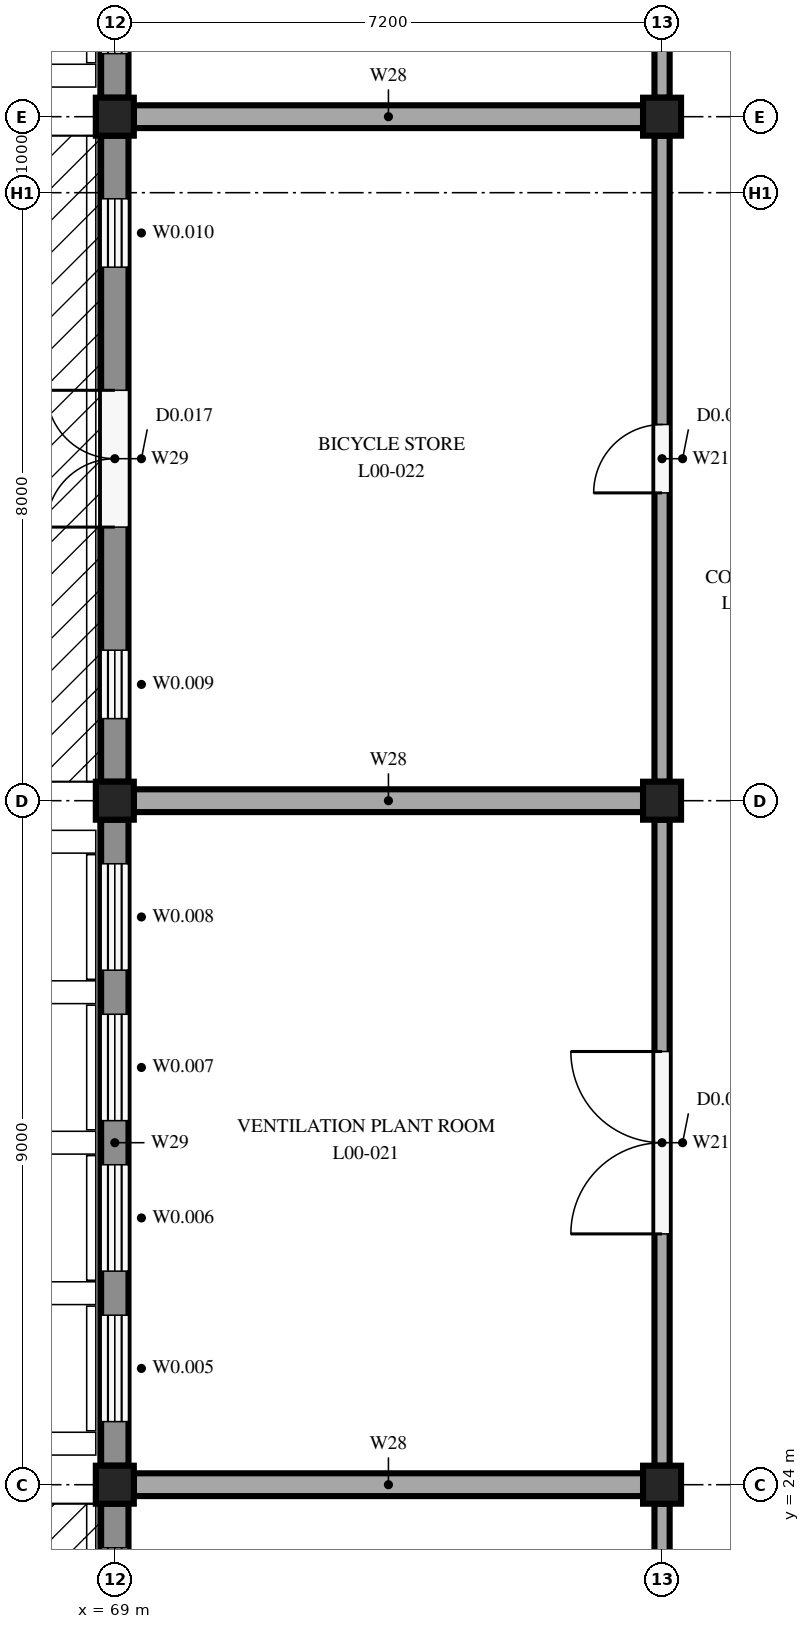
"""IFC4 building model, lengths in metres.
Left out: names, types, materials, properties, quantities, classifications, styles, units other than length and angle.
Written with IfcOpenShell. Run it as: python <this file> out.ifc"""

import sys

from ifc_helpers import new_model, si_unit, direction, frame, frame_2d, origin, origin_2d, place, context, subcontext, project, spatial, rectangle, extrude, element, fill, save


model = new_model("IFC4")
c1 = context("Model", 3, precision=1e-05, world=origin(), true_north=direction((0.0, 1.0)))
c2 = subcontext(c1, "Body", "Model", "MODEL_VIEW")
j1 = project(units=[si_unit("LENGTHUNIT", "METRE"), si_unit("PLANEANGLEUNIT", "RADIAN")], contexts=[c1])
p1 = place(None, origin())
s1 = spatial("IfcSite", under=j1, at=p1, CompositionType="ELEMENT")
p2 = place(p1, origin())
s2 = spatial("IfcBuilding", under=s1, at=p2, CompositionType="ELEMENT")
p3 = place(p2, origin())
s3 = spatial("IfcBuildingStorey", under=s2, at=p3, CompositionType="ELEMENT", Elevation=0.0)
for number, where, z_axis, x_axis in (
    (1, (69.0, 24.0, 0.0), (0.0, 0.0, 1.0), (1.0, 0.0, 0.0)),
    (2, (69.0, 33.0, 0.0), (0.0, 0.0, 1.0), (1.0, 0.0, 0.0)),
    (3, (69.0, 42.0, 0.0), (0.0, 0.0, 1.0), (1.0, 0.0, 0.0)),
    (4, (76.2, 24.0, 0.0), (0.0, 0.0, 1.0), (1.0, 0.0, 0.0)),
    (5, (76.2, 33.0, 0.0), (0.0, 0.0, 1.0), (1.0, 0.0, 0.0)),
    (6, (76.2, 42.0, 0.0), (0.0, 0.0, 1.0), (1.0, 0.0, 0.0)),
):
    element("IfcColumn", number, at=place(p3, frame(where, z_axis=z_axis, x_axis=x_axis)), inside=s3, PredefinedType="COLUMN", context=c2, shape_type="SweptSolid", body=[
        extrude(rectangle(XDim=0.5, YDim=0.5, at=origin_2d()), origin(), (0.0, 0.0, 1.0), 4.25),
    ])
p4 = place(p3, frame((69.0, 15.25, 0.0), z_axis=(0.0, 0.0, 1.0), x_axis=(0.0, 1.0, 0.0)))
e7 = element("IfcWall", 7, at=p4, inside=s3, PredefinedType="STANDARD", context=c2, shape_type="SweptSolid", body=[
    extrude(rectangle(XDim=8.5, YDim=0.36, at=frame_2d((4.25, 0.0))), origin(), (0.0, 0.0, 1.0), 3.75),
])
p5 = place(p4, frame((0.58, 0.0, 2.2)))
e8 = element("IfcOpeningElement", 8, at=p5, cuts=e7, PredefinedType="OPENING", context=c2, shape_type="SweptSolid", body=[
    extrude(rectangle(XDim=1.4, YDim=1.2, at=frame_2d((0.7, 0.6))), frame((0.0, 0.19, 0.0), z_axis=(0.0, -1.0, 0.0), x_axis=(1.0, 0.0, 0.0)), (0.0, 0.0, 1.0), 0.38),
])
p6 = place(p4, frame((3.625, 0.0, 0.0)))
e9 = element("IfcOpeningElement", 9, at=p6, cuts=e7, PredefinedType="OPENING", context=c2, shape_type="SweptSolid", body=[
    extrude(rectangle(XDim=1.2, YDim=2.1, at=frame_2d((0.6, 1.05))), frame((0.0, 0.19, 0.0), z_axis=(0.0, -1.0, 0.0), x_axis=(1.0, 0.0, 0.0)), (0.0, 0.0, 1.0), 0.38),
])
p7 = place(p4, frame((6.52, 0.0, 2.2)))
e10 = element("IfcOpeningElement", 10, at=p7, cuts=e7, PredefinedType="OPENING", context=c2, shape_type="SweptSolid", body=[
    extrude(rectangle(XDim=1.4, YDim=1.2, at=frame_2d((0.7, 0.6))), frame((0.0, 0.19, 0.0), z_axis=(0.0, -1.0, 0.0), x_axis=(1.0, 0.0, 0.0)), (0.0, 0.0, 1.0), 0.38),
])
p8 = place(p3, frame((69.0, 24.25, 0.0), z_axis=(0.0, 0.0, 1.0), x_axis=(0.0, 1.0, 0.0)))
e11 = element("IfcWall", 11, at=p8, inside=s3, PredefinedType="STANDARD", context=c2, shape_type="SweptSolid", body=[
    extrude(rectangle(XDim=8.5, YDim=0.36, at=frame_2d((4.25, 0.0))), origin(), (0.0, 0.0, 1.0), 3.75),
])
p9 = place(p8, frame((0.58, 0.0, 2.2)))
e12 = element("IfcOpeningElement", 12, at=p9, cuts=e11, PredefinedType="OPENING", context=c2, shape_type="SweptSolid", body=[
    extrude(rectangle(XDim=1.4, YDim=1.2, at=frame_2d((0.7, 0.6))), frame((0.0, 0.19, 0.0), z_axis=(0.0, -1.0, 0.0), x_axis=(1.0, 0.0, 0.0)), (0.0, 0.0, 1.0), 0.38),
])
p10 = place(p8, frame((2.56, 0.0, 2.2)))
e13 = element("IfcOpeningElement", 13, at=p10, cuts=e11, PredefinedType="OPENING", context=c2, shape_type="SweptSolid", body=[
    extrude(rectangle(XDim=1.4, YDim=1.2, at=frame_2d((0.7, 0.6))), frame((0.0, 0.19, 0.0), z_axis=(0.0, -1.0, 0.0), x_axis=(1.0, 0.0, 0.0)), (0.0, 0.0, 1.0), 0.38),
])
p11 = place(p8, frame((4.54, 0.0, 2.2)))
e14 = element("IfcOpeningElement", 14, at=p11, cuts=e11, PredefinedType="OPENING", context=c2, shape_type="SweptSolid", body=[
    extrude(rectangle(XDim=1.4, YDim=1.2, at=frame_2d((0.7, 0.6))), frame((0.0, 0.19, 0.0), z_axis=(0.0, -1.0, 0.0), x_axis=(1.0, 0.0, 0.0)), (0.0, 0.0, 1.0), 0.38),
])
p12 = place(p8, frame((6.52, 0.0, 2.2)))
e15 = element("IfcOpeningElement", 15, at=p12, cuts=e11, PredefinedType="OPENING", context=c2, shape_type="SweptSolid", body=[
    extrude(rectangle(XDim=1.4, YDim=1.2, at=frame_2d((0.7, 0.6))), frame((0.0, 0.19, 0.0), z_axis=(0.0, -1.0, 0.0), x_axis=(1.0, 0.0, 0.0)), (0.0, 0.0, 1.0), 0.38),
])
p13 = place(p3, frame((69.0, 33.25, 0.0), z_axis=(0.0, 0.0, 1.0), x_axis=(0.0, 1.0, 0.0)))
e16 = element("IfcWall", 16, at=p13, inside=s3, PredefinedType="STANDARD", context=c2, shape_type="SweptSolid", body=[
    extrude(rectangle(XDim=8.5, YDim=0.36, at=frame_2d((4.25, 0.0))), origin(), (0.0, 0.0, 1.0), 3.75),
])
p14 = place(p13, frame((0.83, 0.0, 1.6)))
e17 = element("IfcOpeningElement", 17, at=p14, cuts=e16, PredefinedType="OPENING", context=c2, shape_type="SweptSolid", body=[
    extrude(rectangle(XDim=0.9, YDim=1.0, at=frame_2d((0.45, 0.5))), frame((0.0, 0.19, 0.0), z_axis=(0.0, -1.0, 0.0), x_axis=(1.0, 0.0, 0.0)), (0.0, 0.0, 1.0), 0.38),
])
p15 = place(p13, frame((3.35, 0.0, 0.0)))
e18 = element("IfcOpeningElement", 18, at=p15, cuts=e16, PredefinedType="OPENING", context=c2, shape_type="SweptSolid", body=[
    extrude(rectangle(XDim=1.8, YDim=2.1, at=frame_2d((0.9, 1.05))), frame((0.0, 0.19, 0.0), z_axis=(0.0, -1.0, 0.0), x_axis=(1.0, 0.0, 0.0)), (0.0, 0.0, 1.0), 0.38),
])
p16 = place(p13, frame((6.77, 0.0, 1.6)))
e19 = element("IfcOpeningElement", 19, at=p16, cuts=e16, PredefinedType="OPENING", context=c2, shape_type="SweptSolid", body=[
    extrude(rectangle(XDim=0.9, YDim=1.0, at=frame_2d((0.45, 0.5))), frame((0.0, 0.19, 0.0), z_axis=(0.0, -1.0, 0.0), x_axis=(1.0, 0.0, 0.0)), (0.0, 0.0, 1.0), 0.38),
])
p17 = place(p3, frame((69.0, 42.25, 0.0), z_axis=(0.0, 0.0, 1.0), x_axis=(0.0, 1.0, 0.0)))
e20 = element("IfcWall", 20, at=p17, inside=s3, PredefinedType="STANDARD", context=c2, shape_type="SweptSolid", body=[
    extrude(rectangle(XDim=8.5, YDim=0.36, at=frame_2d((4.25, 0.0))), origin(), (0.0, 0.0, 1.0), 3.75),
])
p18 = place(p17, frame((0.58, 0.0, 2.2)))
e21 = element("IfcOpeningElement", 21, at=p18, cuts=e20, PredefinedType="OPENING", context=c2, shape_type="SweptSolid", body=[
    extrude(rectangle(XDim=1.4, YDim=1.2, at=frame_2d((0.7, 0.6))), frame((0.0, 0.19, 0.0), z_axis=(0.0, -1.0, 0.0), x_axis=(1.0, 0.0, 0.0)), (0.0, 0.0, 1.0), 0.38),
])
p19 = place(p17, frame((2.56, 0.0, 2.2)))
e22 = element("IfcOpeningElement", 22, at=p19, cuts=e20, PredefinedType="OPENING", context=c2, shape_type="SweptSolid", body=[
    extrude(rectangle(XDim=1.4, YDim=1.2, at=frame_2d((0.7, 0.6))), frame((0.0, 0.19, 0.0), z_axis=(0.0, -1.0, 0.0), x_axis=(1.0, 0.0, 0.0)), (0.0, 0.0, 1.0), 0.38),
])
p20 = place(p17, frame((5.925, 0.0, 0.0)))
e23 = element("IfcOpeningElement", 23, at=p20, cuts=e20, PredefinedType="OPENING", context=c2, shape_type="SweptSolid", body=[
    extrude(rectangle(XDim=1.2, YDim=2.1, at=frame_2d((0.6, 1.05))), frame((0.0, 0.19, 0.0), z_axis=(0.0, -1.0, 0.0), x_axis=(1.0, 0.0, 0.0)), (0.0, 0.0, 1.0), 0.38),
])
p21 = place(p3, frame((76.2, 15.25, 0.0), z_axis=(0.0, 0.0, 1.0), x_axis=(0.0, 1.0, 0.0)))
e24 = element("IfcWall", 24, at=p21, inside=s3, PredefinedType="PARTITIONING", context=c2, shape_type="SweptSolid", body=[
    extrude(rectangle(XDim=8.5, YDim=0.2, at=frame_2d((4.25, 0.0))), origin(), (0.0, 0.0, 1.0), 3.8),
])
p22 = place(p21, frame((3.05, 0.0, 0.0)))
e25 = element("IfcOpeningElement", 25, at=p22, cuts=e24, PredefinedType="OPENING", context=c2, shape_type="SweptSolid", body=[
    extrude(rectangle(XDim=2.4, YDim=2.1, at=frame_2d((1.2, 1.05))), frame((0.0, 0.11, 0.0), z_axis=(0.0, -1.0, 0.0), x_axis=(1.0, 0.0, 0.0)), (0.0, 0.0, 1.0), 0.22),
])
p23 = place(p3, frame((76.2, 24.25, 0.0), z_axis=(0.0, 0.0, 1.0), x_axis=(0.0, 1.0, 0.0)))
e26 = element("IfcWall", 26, at=p23, inside=s3, PredefinedType="PARTITIONING", context=c2, shape_type="SweptSolid", body=[
    extrude(rectangle(XDim=8.5, YDim=0.2, at=frame_2d((4.25, 0.0))), origin(), (0.0, 0.0, 1.0), 3.8),
])
p24 = place(p23, frame((3.05, 0.0, 0.0)))
e27 = element("IfcOpeningElement", 27, at=p24, cuts=e26, PredefinedType="OPENING", context=c2, shape_type="SweptSolid", body=[
    extrude(rectangle(XDim=2.4, YDim=2.1, at=frame_2d((1.2, 1.05))), frame((0.0, 0.11, 0.0), z_axis=(0.0, -1.0, 0.0), x_axis=(1.0, 0.0, 0.0)), (0.0, 0.0, 1.0), 0.22),
])
p25 = place(p3, frame((76.2, 33.25, 0.0), z_axis=(0.0, 0.0, 1.0), x_axis=(0.0, 1.0, 0.0)))
e28 = element("IfcWall", 28, at=p25, inside=s3, PredefinedType="PARTITIONING", context=c2, shape_type="SweptSolid", body=[
    extrude(rectangle(XDim=8.5, YDim=0.2, at=frame_2d((4.25, 0.0))), origin(), (0.0, 0.0, 1.0), 3.8),
])
p26 = place(p25, frame((3.8, 0.0, 0.0)))
e29 = element("IfcOpeningElement", 29, at=p26, cuts=e28, PredefinedType="OPENING", context=c2, shape_type="SweptSolid", body=[
    extrude(rectangle(XDim=0.9, YDim=2.1, at=frame_2d((0.45, 1.05))), frame((0.0, 0.11, 0.0), z_axis=(0.0, -1.0, 0.0), x_axis=(1.0, 0.0, 0.0)), (0.0, 0.0, 1.0), 0.22),
])
p27 = place(p3, frame((76.2, 42.25, 0.0), z_axis=(0.0, 0.0, 1.0), x_axis=(0.0, 1.0, 0.0)))
e30 = element("IfcWall", 30, at=p27, inside=s3, PredefinedType="PARTITIONING", context=c2, shape_type="SweptSolid", body=[
    extrude(rectangle(XDim=8.5, YDim=0.2, at=frame_2d((4.25, 0.0))), origin(), (0.0, 0.0, 1.0), 3.8),
])
p28 = place(p27, frame((1.45, 0.0, 0.0)))
e31 = element("IfcOpeningElement", 31, at=p28, cuts=e30, PredefinedType="OPENING", context=c2, shape_type="SweptSolid", body=[
    extrude(rectangle(XDim=1.2, YDim=2.1, at=frame_2d((0.6, 1.05))), frame((0.0, 0.11, 0.0), z_axis=(0.0, -1.0, 0.0), x_axis=(1.0, 0.0, 0.0)), (0.0, 0.0, 1.0), 0.22),
])
p29 = place(p27, frame((6.0, 0.0, 0.0)))
e32 = element("IfcOpeningElement", 32, at=p29, cuts=e30, PredefinedType="OPENING", context=c2, shape_type="SweptSolid", body=[
    extrude(rectangle(XDim=0.9, YDim=2.1, at=frame_2d((0.45, 1.05))), frame((0.0, 0.11, 0.0), z_axis=(0.0, -1.0, 0.0), x_axis=(1.0, 0.0, 0.0)), (0.0, 0.0, 1.0), 0.22),
])
for number, where, z_axis, x_axis in (
    (33, (69.25, 24.0, 0.0), (0.0, 0.0, 1.0), (1.0, 0.0, 0.0)),
    (34, (69.25, 33.0, 0.0), (0.0, 0.0, 1.0), (1.0, 0.0, 0.0)),
    (35, (69.25, 42.0, 0.0), (0.0, 0.0, 1.0), (1.0, 0.0, 0.0)),
):
    element("IfcWall", number, at=place(p3, frame(where, z_axis=z_axis, x_axis=x_axis)), inside=s3, PredefinedType="SOLIDWALL", context=c2, shape_type="SweptSolid", body=[
        extrude(rectangle(XDim=6.7, YDim=0.3, at=frame_2d((3.35, 0.0))), origin(), (0.0, 0.0, 1.0), 3.8),
    ])
p30 = place(p7, origin())
e36 = element("IfcWindow", 36, at=p30, inside=s3, PartitioningType="DOUBLE_PANEL_VERTICAL", PredefinedType="WINDOW", context=c2, shape_type="SweptSolid", body=[
    extrude(rectangle(XDim=1.4, YDim=1.2, at=frame_2d((0.7, 0.6))), frame((0.0, 0.03, 0.0), z_axis=(0.0, -1.0, 0.0), x_axis=(1.0, 0.0, 0.0)), (0.0, 0.0, 1.0), 0.06),
])
fill(e10, e36)
p31 = place(p9, origin())
e37 = element("IfcWindow", 37, at=p31, inside=s3, PartitioningType="DOUBLE_PANEL_VERTICAL", PredefinedType="WINDOW", context=c2, shape_type="SweptSolid", body=[
    extrude(rectangle(XDim=1.4, YDim=1.2, at=frame_2d((0.7, 0.6))), frame((0.0, 0.03, 0.0), z_axis=(0.0, -1.0, 0.0), x_axis=(1.0, 0.0, 0.0)), (0.0, 0.0, 1.0), 0.06),
])
fill(e12, e37)
p32 = place(p10, origin())
e38 = element("IfcWindow", 38, at=p32, inside=s3, PartitioningType="DOUBLE_PANEL_VERTICAL", PredefinedType="WINDOW", context=c2, shape_type="SweptSolid", body=[
    extrude(rectangle(XDim=1.4, YDim=1.2, at=frame_2d((0.7, 0.6))), frame((0.0, 0.03, 0.0), z_axis=(0.0, -1.0, 0.0), x_axis=(1.0, 0.0, 0.0)), (0.0, 0.0, 1.0), 0.06),
])
fill(e13, e38)
p33 = place(p11, origin())
e39 = element("IfcWindow", 39, at=p33, inside=s3, PartitioningType="DOUBLE_PANEL_VERTICAL", PredefinedType="WINDOW", context=c2, shape_type="SweptSolid", body=[
    extrude(rectangle(XDim=1.4, YDim=1.2, at=frame_2d((0.7, 0.6))), frame((0.0, 0.03, 0.0), z_axis=(0.0, -1.0, 0.0), x_axis=(1.0, 0.0, 0.0)), (0.0, 0.0, 1.0), 0.06),
])
fill(e14, e39)
p34 = place(p12, origin())
e40 = element("IfcWindow", 40, at=p34, inside=s3, PartitioningType="DOUBLE_PANEL_VERTICAL", PredefinedType="WINDOW", context=c2, shape_type="SweptSolid", body=[
    extrude(rectangle(XDim=1.4, YDim=1.2, at=frame_2d((0.7, 0.6))), frame((0.0, 0.03, 0.0), z_axis=(0.0, -1.0, 0.0), x_axis=(1.0, 0.0, 0.0)), (0.0, 0.0, 1.0), 0.06),
])
fill(e15, e40)
p35 = place(p14, origin())
e41 = element("IfcWindow", 41, at=p35, inside=s3, PartitioningType="SINGLE_PANEL", PredefinedType="WINDOW", context=c2, shape_type="SweptSolid", body=[
    extrude(rectangle(XDim=0.9, YDim=1.0, at=frame_2d((0.45, 0.5))), frame((0.0, 0.03, 0.0), z_axis=(0.0, -1.0, 0.0), x_axis=(1.0, 0.0, 0.0)), (0.0, 0.0, 1.0), 0.06),
])
fill(e17, e41)
p36 = place(p15, origin())
e42 = element("IfcDoor", 42, at=p36, inside=s3, OperationType="DOUBLE_DOOR_SINGLE_SWING", PredefinedType="DOOR", context=c2, shape_type="SweptSolid", body=[
    extrude(rectangle(XDim=1.8, YDim=2.1, at=frame_2d((0.9, 1.05))), frame((0.0, 0.025, 0.0), z_axis=(0.0, -1.0, 0.0), x_axis=(1.0, 0.0, 0.0)), (0.0, 0.0, 1.0), 0.05),
])
fill(e18, e42)
p37 = place(p16, origin())
e43 = element("IfcWindow", 43, at=p37, inside=s3, PartitioningType="SINGLE_PANEL", PredefinedType="WINDOW", context=c2, shape_type="SweptSolid", body=[
    extrude(rectangle(XDim=0.9, YDim=1.0, at=frame_2d((0.45, 0.5))), frame((0.0, 0.03, 0.0), z_axis=(0.0, -1.0, 0.0), x_axis=(1.0, 0.0, 0.0)), (0.0, 0.0, 1.0), 0.06),
])
fill(e19, e43)
p38 = place(p18, origin())
e44 = element("IfcWindow", 44, at=p38, inside=s3, PartitioningType="DOUBLE_PANEL_VERTICAL", PredefinedType="WINDOW", context=c2, shape_type="SweptSolid", body=[
    extrude(rectangle(XDim=1.4, YDim=1.2, at=frame_2d((0.7, 0.6))), frame((0.0, 0.03, 0.0), z_axis=(0.0, -1.0, 0.0), x_axis=(1.0, 0.0, 0.0)), (0.0, 0.0, 1.0), 0.06),
])
fill(e21, e44)
p39 = place(p24, origin())
e45 = element("IfcDoor", 45, at=p39, inside=s3, OperationType="DOUBLE_DOOR_DOUBLE_SWING", PredefinedType="DOOR", context=c2, shape_type="SweptSolid", body=[
    extrude(rectangle(XDim=2.4, YDim=2.1, at=frame_2d((1.2, 1.05))), frame((0.0, 0.025, 0.0), z_axis=(0.0, -1.0, 0.0), x_axis=(1.0, 0.0, 0.0)), (0.0, 0.0, 1.0), 0.05),
])
fill(e27, e45)
p40 = place(p26, origin())
e46 = element("IfcDoor", 46, at=p40, inside=s3, OperationType="SINGLE_SWING_LEFT", PredefinedType="DOOR", context=c2, shape_type="SweptSolid", body=[
    extrude(rectangle(XDim=0.9, YDim=2.1, at=frame_2d((0.45, 1.05))), frame((0.0, 0.025, 0.0), z_axis=(0.0, -1.0, 0.0), x_axis=(1.0, 0.0, 0.0)), (0.0, 0.0, 1.0), 0.05),
])
fill(e29, e46)
save(model, sys.argv[1])
